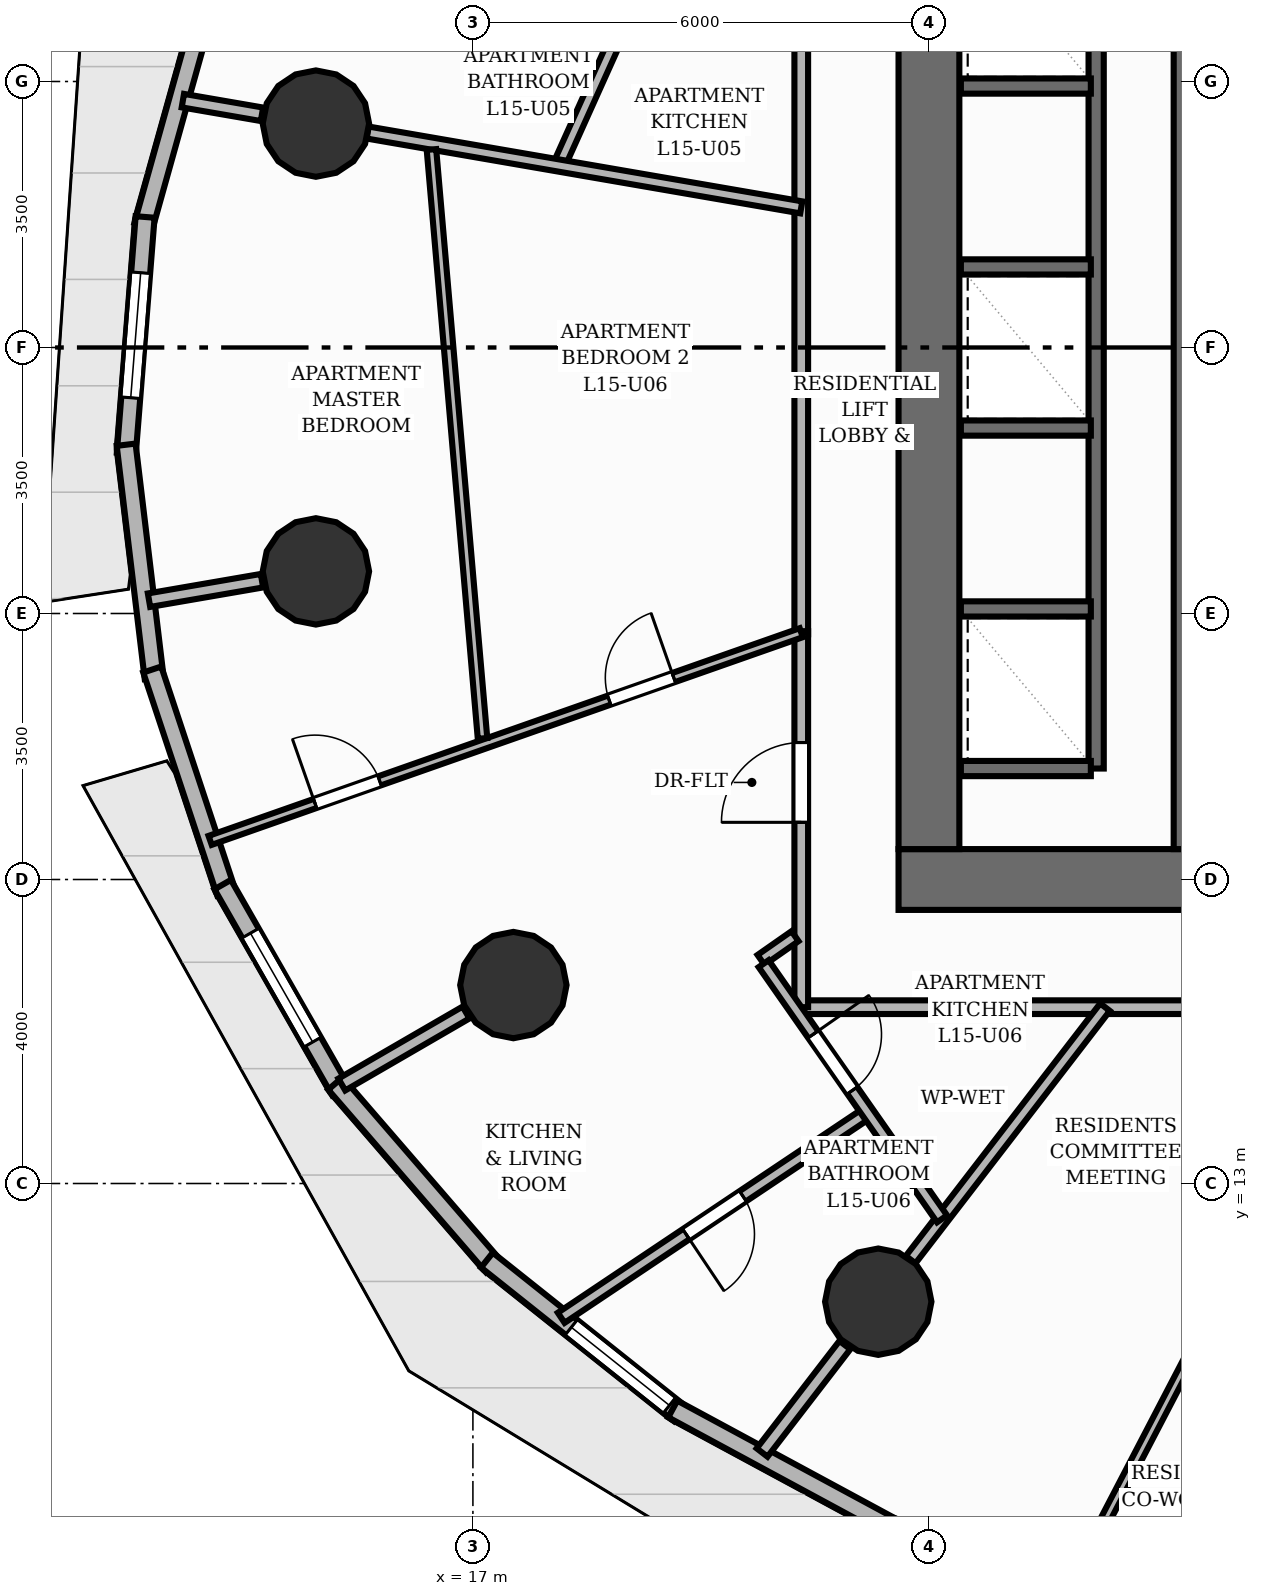
"""IFC4 building model, lengths in metres.
Left out: names, types, materials, properties, quantities, classifications, styles, units other than length and angle.
Written with IfcOpenShell. Run it as: python <this file> out.ifc"""

import sys

from ifc_helpers import new_model, si_unit, direction, frame, frame_2d, origin, origin_2d, place, context, subcontext, project, spatial, rectangle, circle, extrude, element, fill, save


model = new_model("IFC4")
c1 = context("Model", 3, precision=1e-05, world=origin(), true_north=direction((0.0, 1.0)))
c2 = subcontext(c1, "Body", "Model", "MODEL_VIEW")
j1 = project(units=[si_unit("LENGTHUNIT", "METRE"), si_unit("PLANEANGLEUNIT", "RADIAN")], contexts=[c1])
p1 = place(None, origin())
s1 = spatial("IfcSite", under=j1, at=p1, CompositionType="ELEMENT")
p2 = place(p1, origin())
s2 = spatial("IfcBuilding", under=s1, at=p2, CompositionType="ELEMENT")
p3 = place(p2, frame((0.0, 0.0, 53.6)))
s3 = spatial("IfcBuildingStorey", under=s2, at=p3, CompositionType="ELEMENT", Elevation=53.6)
p4 = place(p3, frame((22.6, 17.0, 0.0), z_axis=(0.0, 0.0, 1.0), x_axis=(1.0, 0.0, 0.0)))
e1 = element("IfcWall", 1, at=p4, inside=s3, PredefinedType="SHEAR", context=c2, shape_type="SweptSolid", body=[
    extrude(rectangle(XDim=18.8, YDim=0.8, at=frame_2d((9.4, 0.0))), origin(), (0.0, 0.0, 1.0), 3.2),
])
p5 = place(p4, frame((5.9, 0.0, 0.0)))
e2 = element("IfcOpeningElement", 2, at=p5, cuts=e1, PredefinedType="OPENING", context=c2, shape_type="SweptSolid", body=[
    extrude(rectangle(XDim=1.1, YDim=2.15, at=frame_2d((0.55, 1.075))), frame((0.0, 0.41, 0.0), z_axis=(0.0, -1.0, 0.0), x_axis=(1.0, 0.0, 0.0)), (0.0, 0.0, 1.0), 0.82),
])
p6 = place(p4, frame((9.45, 0.0, 0.0)))
e3 = element("IfcOpeningElement", 3, at=p6, cuts=e1, PredefinedType="OPENING", context=c2, shape_type="SweptSolid", body=[
    extrude(rectangle(XDim=0.9, YDim=2.1, at=frame_2d((0.45, 1.05))), frame((0.0, 0.41, 0.0), z_axis=(0.0, -1.0, 0.0), x_axis=(1.0, 0.0, 0.0)), (0.0, 0.0, 1.0), 0.82),
])
p7 = place(p3, frame((23.0, 17.4, 0.0), z_axis=(0.0, 0.0, 1.0), x_axis=(0.0, 1.0, 0.0)))
e4 = element("IfcWall", 4, at=p7, inside=s3, PredefinedType="SHEAR", context=c2, shape_type="SweptSolid", body=[
    extrude(rectangle(XDim=13.2, YDim=0.8, at=frame_2d((6.6, 0.0))), origin(), (0.0, 0.0, 1.0), 3.2),
])
p8 = place(p3, frame((26.5, 17.4, 0.0), z_axis=(0.0, 0.0, 1.0), x_axis=(0.0, 1.0, 0.0)))
e5 = element("IfcWall", 5, at=p8, inside=s3, PredefinedType="SHEAR", context=c2, shape_type="SweptSolid", body=[
    extrude(rectangle(XDim=13.2, YDim=0.56, at=frame_2d((6.6, 0.0))), origin(), (0.0, 0.0, 1.0), 3.2),
])
for number, where, z_axis, x_axis in (
    (6, (14.934, 26.946, 0.0), (0.0, 0.0, 1.0), (1.0, 0.0, 0.0)),
    (7, (14.934, 21.054, 0.0), (0.0, 0.0, 1.0), (1.0, 0.0, 0.0)),
    (8, (17.532, 15.611, 0.0), (0.0, 0.0, 1.0), (1.0, 0.0, 0.0)),
    (9, (22.333, 11.445, 0.0), (0.0, 0.0, 1.0), (1.0, 0.0, 0.0)),
):
    element("IfcColumn", number, at=place(p3, frame(where, z_axis=z_axis, x_axis=x_axis)), inside=s3, PredefinedType="COLUMN", context=c2, shape_type="SweptSolid", body=[
        extrude(circle(Radius=0.7, at=origin_2d()), origin(), (0.0, 0.0, 1.0), 3.2),
    ])
p9 = place(p3, frame((12.667, 25.605, 0.0), z_axis=(0.0, 0.0, 1.0), x_axis=(0.269353183383, 0.963041464632, 0.0)))
e10 = element("IfcWall", 10, at=p9, inside=s3, PredefinedType="SOLIDWALL", context=c2, shape_type="SweptSolid", body=[
    extrude(rectangle(XDim=3.174, YDim=0.25, at=frame_2d((1.587, 0.0))), origin(), (0.0, 0.0, 1.0), 2.96),
])
p10 = place(p3, frame((12.44, 22.606, 0.0), z_axis=(0.0, 0.0, 1.0), x_axis=(0.079173066737, 0.996860885733, 0.0)))
e11 = element("IfcWall", 11, at=p10, inside=s3, PredefinedType="SOLIDWALL", context=c2, shape_type="SweptSolid", body=[
    extrude(rectangle(XDim=3.121, YDim=0.25, at=frame_2d((1.56, 0.0))), origin(), (0.0, 0.0, 1.0), 2.96),
])
p11 = place(p10, frame((0.735, 0.0, 0.85)))
e12 = element("IfcOpeningElement", 12, at=p11, cuts=e11, PredefinedType="OPENING", context=c2, shape_type="SweptSolid", body=[
    extrude(rectangle(XDim=1.65, YDim=1.55, at=frame_2d((0.825, 0.775))), frame((0.0, 0.135, 0.0), z_axis=(0.0, -1.0, 0.0), x_axis=(1.0, 0.0, 0.0)), (0.0, 0.0, 1.0), 0.27),
])
p12 = place(p3, frame((12.806, 19.651, 0.0), z_axis=(0.0, 0.0, 1.0), x_axis=(-0.119310240224, 0.992857022223, 0.0)))
e13 = element("IfcWall", 13, at=p12, inside=s3, PredefinedType="SOLIDWALL", context=c2, shape_type="SweptSolid", body=[
    extrude(rectangle(XDim=3.092, YDim=0.25, at=frame_2d((1.546, 0.0))), origin(), (0.0, 0.0, 1.0), 2.96),
])
p13 = place(p3, frame((13.755, 16.828, 0.0), z_axis=(0.0, 0.0, 1.0), x_axis=(-0.314806164357, 0.949155982377, 0.0)))
e14 = element("IfcWall", 14, at=p13, inside=s3, PredefinedType="SOLIDWALL", context=c2, shape_type="SweptSolid", body=[
    extrude(rectangle(XDim=3.092, YDim=0.25, at=frame_2d((1.546, 0.0))), origin(), (0.0, 0.0, 1.0), 2.96),
])
p14 = place(p3, frame((15.256, 14.223, 0.0), z_axis=(0.0, 0.0, 1.0), x_axis=(-0.496155788519, 0.868233513243, 0.0)))
e15 = element("IfcWall", 15, at=p14, inside=s3, PredefinedType="SOLIDWALL", context=c2, shape_type="SweptSolid", body=[
    extrude(rectangle(XDim=3.121, YDim=0.25, at=frame_2d((1.56, 0.0))), origin(), (0.0, 0.0, 1.0), 2.96),
])
p15 = place(p14, frame((0.735, 0.0, 0.85)))
e16 = element("IfcOpeningElement", 16, at=p15, cuts=e15, PredefinedType="OPENING", context=c2, shape_type="SweptSolid", body=[
    extrude(rectangle(XDim=1.65, YDim=1.55, at=frame_2d((0.825, 0.775))), frame((0.0, 0.135, 0.0), z_axis=(0.0, -1.0, 0.0), x_axis=(1.0, 0.0, 0.0)), (0.0, 0.0, 1.0), 0.27),
])
p16 = place(p3, frame((17.266, 11.914, 0.0), z_axis=(0.0, 0.0, 1.0), x_axis=(-0.653770062489, 0.75669327035, 0.0)))
e17 = element("IfcWall", 17, at=p16, inside=s3, PredefinedType="SOLIDWALL", context=c2, shape_type="SweptSolid", body=[
    extrude(rectangle(XDim=3.174, YDim=0.25, at=frame_2d((1.587, 0.0))), origin(), (0.0, 0.0, 1.0), 2.96),
])
p17 = place(p3, frame((19.722, 9.971, 0.0), z_axis=(0.0, 0.0, 1.0), x_axis=(-0.78232767864, 0.622867083119, 0.0)))
e18 = element("IfcWall", 18, at=p17, inside=s3, PredefinedType="SOLIDWALL", context=c2, shape_type="SweptSolid", body=[
    extrude(rectangle(XDim=3.244, YDim=0.25, at=frame_2d((1.622, 0.0))), origin(), (0.0, 0.0, 1.0), 2.96),
])
p18 = place(p17, frame((0.175, 0.0, 0.85)))
e19 = element("IfcOpeningElement", 19, at=p18, cuts=e18, PredefinedType="OPENING", context=c2, shape_type="SweptSolid", body=[
    extrude(rectangle(XDim=1.65, YDim=1.55, at=frame_2d((0.825, 0.775))), frame((0.0, 0.135, 0.0), z_axis=(0.0, -1.0, 0.0), x_axis=(1.0, 0.0, 0.0)), (0.0, 0.0, 1.0), 0.27),
])
p19 = place(p3, frame((22.552, 8.454, 0.0), z_axis=(0.0, 0.0, 1.0), x_axis=(-0.879811992908, 0.475321845843, 0.0)))
e20 = element("IfcWall", 20, at=p19, inside=s3, PredefinedType="SOLIDWALL", context=c2, shape_type="SweptSolid", body=[
    extrude(rectangle(XDim=3.323, YDim=0.25, at=frame_2d((1.661, 0.0))), origin(), (0.0, 0.0, 1.0), 2.96),
])
p20 = place(p3, frame((25.67, 7.407, 0.0), z_axis=(0.0, 0.0, 1.0), x_axis=(-0.947149503871, 0.320792483262, 0.0)))
e21 = element("IfcWall", 21, at=p20, inside=s3, PredefinedType="SOLIDWALL", context=c2, shape_type="SweptSolid", body=[
    extrude(rectangle(XDim=3.399, YDim=0.25, at=frame_2d((1.699, 0.0))), origin(), (0.0, 0.0, 1.0), 2.96),
])
p21 = place(p20, frame((1.074, 0.0, 0.85)))
e22 = element("IfcOpeningElement", 22, at=p21, cuts=e21, PredefinedType="OPENING", context=c2, shape_type="SweptSolid", body=[
    extrude(rectangle(XDim=1.65, YDim=1.55, at=frame_2d((0.825, 0.775))), frame((0.0, 0.135, 0.0), z_axis=(0.0, -1.0, 0.0), x_axis=(1.0, 0.0, 0.0)), (0.0, 0.0, 1.0), 0.27),
])
p22 = place(p3, frame((25.2, 18.46, 0.0), z_axis=(0.0, 0.0, 1.0), x_axis=(0.0, 1.0, 0.0)))
e23 = element("IfcWall", 23, at=p22, inside=s3, PredefinedType="SHEAR", context=c2, shape_type="SweptSolid", body=[
    extrude(rectangle(XDim=11.08, YDim=0.2, at=frame_2d((5.54, 0.0))), origin(), (0.0, 0.0, 1.0), 3.2),
])
for number, where, z_axis, x_axis in (
    (24, (23.42, 18.46, 0.0), (0.0, 0.0, 1.0), (1.0, 0.0, 0.0)),
    (25, (23.42, 20.56, 0.0), (0.0, 0.0, 1.0), (1.0, 0.0, 0.0)),
    (26, (23.42, 22.94, 0.0), (0.0, 0.0, 1.0), (1.0, 0.0, 0.0)),
    (27, (23.42, 25.06, 0.0), (0.0, 0.0, 1.0), (1.0, 0.0, 0.0)),
    (28, (23.42, 27.44, 0.0), (0.0, 0.0, 1.0), (1.0, 0.0, 0.0)),
):
    element("IfcWall", number, at=place(p3, frame(where, z_axis=z_axis, x_axis=x_axis)), inside=s3, PredefinedType="SHEAR", context=c2, shape_type="SweptSolid", body=[
        extrude(rectangle(XDim=1.71, YDim=0.2, at=frame_2d((0.855, 0.0))), origin(), (0.0, 0.0, 1.0), 3.2),
    ])
p23 = place(p3, frame((14.225, 27.068, 0.0), z_axis=(0.0, 0.0, 1.0), x_axis=(-0.985428074572, 0.17009265077, 0.0)))
e29 = element("IfcWall", 29, at=p23, inside=s3, PredefinedType="PARTITIONING", context=c2, shape_type="SweptSolid", body=[
    extrude(rectangle(XDim=1.056, YDim=0.18, at=frame_2d((0.528, 0.0))), origin(), (0.0, 0.0, 1.0), 2.178),
])
p24 = place(p3, frame((14.225, 20.932, 0.0), z_axis=(0.0, 0.0, 1.0), x_axis=(-0.985418960314, -0.170145445587, 0.0)))
e30 = element("IfcWall", 30, at=p24, inside=s3, PredefinedType="PARTITIONING", context=c2, shape_type="SweptSolid", body=[
    extrude(rectangle(XDim=1.508, YDim=0.18, at=frame_2d((0.754, 0.0))), origin(), (0.0, 0.0, 1.0), 2.178),
])
p25 = place(p3, frame((16.909, 15.25, 0.0), z_axis=(0.0, 0.0, 1.0), x_axis=(-0.865027823723, -0.501723892379, 0.0)))
e31 = element("IfcWall", 31, at=p25, inside=s3, PredefinedType="PARTITIONING", context=c2, shape_type="SweptSolid", body=[
    extrude(rectangle(XDim=1.889, YDim=0.18, at=frame_2d((0.944, 0.0))), origin(), (0.0, 0.0, 1.0), 2.178),
])
p26 = place(p3, frame((21.894, 10.874, 0.0), z_axis=(0.0, 0.0, 1.0), x_axis=(-0.61002145357, -0.792384897752, 0.0)))
e32 = element("IfcWall", 32, at=p26, inside=s3, PredefinedType="PARTITIONING", context=c2, shape_type="SweptSolid", body=[
    extrude(rectangle(XDim=1.785, YDim=0.18, at=frame_2d((0.892, 0.0))), origin(), (0.0, 0.0, 1.0), 2.178),
])
p27 = place(p3, frame((28.852, 15.32, 0.0), z_axis=(0.0, 0.0, 1.0), x_axis=(-1.0, 0.0, 0.0)))
e33 = element("IfcWall", 33, at=p27, inside=s3, PredefinedType="PARTITIONING", context=c2, shape_type="SweptSolid", body=[
    extrude(rectangle(XDim=7.532, YDim=0.18, at=frame_2d((3.766, 0.0))), origin(), (0.0, 0.0, 1.0), 2.955),
])
p28 = place(p27, frame((1.33, 0.0, 0.0)))
e34 = element("IfcOpeningElement", 34, at=p28, cuts=e33, PredefinedType="OPENING", context=c2, shape_type="SweptSolid", body=[
    extrude(rectangle(XDim=0.9, YDim=2.1, at=frame_2d((0.45, 1.05))), frame((0.0, 0.1, 0.0), z_axis=(0.0, -1.0, 0.0), x_axis=(1.0, 0.0, 0.0)), (0.0, 0.0, 1.0), 0.2),
])
p29 = place(p3, frame((21.32, 20.226, 0.0), z_axis=(0.0, 0.0, 1.0), x_axis=(0.0, 1.0, 0.0)))
e35 = element("IfcWall", 35, at=p29, inside=s3, PredefinedType="PARTITIONING", context=c2, shape_type="SweptSolid", body=[
    extrude(rectangle(XDim=12.454, YDim=0.18, at=frame_2d((6.227, 0.0))), origin(), (0.0, 0.0, 1.0), 2.955),
])
p30 = place(p29, frame((9.711, 0.0, 0.0)))
e36 = element("IfcOpeningElement", 36, at=p30, cuts=e35, PredefinedType="OPENING", context=c2, shape_type="SweptSolid", body=[
    extrude(rectangle(XDim=1.05, YDim=2.15, at=frame_2d((0.525, 1.075))), frame((0.0, 0.1, 0.0), z_axis=(0.0, -1.0, 0.0), x_axis=(1.0, 0.0, 0.0)), (0.0, 0.0, 1.0), 0.2),
])
p31 = place(p3, frame((21.32, 15.32, 0.0), z_axis=(0.0, 0.0, 1.0), x_axis=(0.0, 1.0, 0.0)))
e37 = element("IfcWall", 37, at=p31, inside=s3, PredefinedType="PARTITIONING", context=c2, shape_type="SweptSolid", body=[
    extrude(rectangle(XDim=4.947, YDim=0.18, at=frame_2d((2.474, 0.0))), origin(), (0.0, 0.0, 1.0), 2.955),
])
p32 = place(p31, frame((2.432, 0.0, 0.0)))
e38 = element("IfcOpeningElement", 38, at=p32, cuts=e37, PredefinedType="OPENING", context=c2, shape_type="SweptSolid", body=[
    extrude(rectangle(XDim=1.05, YDim=2.15, at=frame_2d((0.525, 1.075))), frame((0.0, 0.1, 0.0), z_axis=(0.0, -1.0, 0.0), x_axis=(1.0, 0.0, 0.0)), (0.0, 0.0, 1.0), 0.2),
])
p33 = place(p3, frame((28.786, 15.231, 0.0), z_axis=(0.0, 0.0, 1.0), x_axis=(-0.461913695099, -0.886924877473, 0.0)))
e39 = element("IfcWall", 39, at=p33, inside=s3, PredefinedType="PARTITIONING", context=c2, shape_type="SweptSolid", body=[
    extrude(rectangle(XDim=8.495, YDim=0.125, at=frame_2d((4.247, 0.0))), origin(), (0.0, 0.0, 1.0), 2.641),
])
p34 = place(p33, frame((3.938, 0.0, 0.0)))
e40 = element("IfcOpeningElement", 40, at=p34, cuts=e39, PredefinedType="OPENING", context=c2, shape_type="SweptSolid", body=[
    extrude(rectangle(XDim=0.9, YDim=2.1, at=frame_2d((0.45, 1.05))), frame((0.0, 0.073, 0.0), z_axis=(0.0, -1.0, 0.0), x_axis=(1.0, 0.0, 0.0)), (0.0, 0.0, 1.0), 0.145),
])
p35 = place(p3, frame((22.759, 11.998, 0.0), z_axis=(0.0, 0.0, 1.0), x_axis=(0.60996965366, 0.792424773473, 0.0)))
e41 = element("IfcWall", 41, at=p35, inside=s3, PredefinedType="PLUMBINGWALL", context=c2, shape_type="SweptSolid", body=[
    extrude(rectangle(XDim=4.192, YDim=0.16, at=frame_2d((2.096, 0.0))), origin(), (0.0, 0.0, 1.0), 2.178),
])
p36 = place(p3, frame((26.193, 7.345, 0.0), z_axis=(0.0, 0.0, 1.0), x_axis=(0.392702721524, 0.919665467715, 0.0)))
e42 = element("IfcWall", 42, at=p36, inside=s3, PredefinedType="PARTITIONING", context=c2, shape_type="SweptSolid", body=[
    extrude(rectangle(XDim=8.552, YDim=0.125, at=frame_2d((4.276, 0.0))), origin(), (0.0, 0.0, 1.0), 2.955),
])
p37 = place(p3, frame((19.342, 29.089, 0.0), z_axis=(0.0, 0.0, 1.0), x_axis=(-0.410144748917, -0.912020441073, 0.0)))
e43 = element("IfcWall", 43, at=p37, inside=s3, PredefinedType="PLUMBINGWALL", context=c2, shape_type="SweptSolid", body=[
    extrude(rectangle(XDim=2.954, YDim=0.16, at=frame_2d((1.477, 0.0))), origin(), (0.0, 0.0, 1.0), 2.955),
])
p38 = place(p3, frame((21.32, 25.844, 0.0), z_axis=(0.0, 0.0, 1.0), x_axis=(-0.985429175336, 0.170086273394, 0.0)))
e44 = element("IfcWall", 44, at=p38, inside=s3, PredefinedType="PLUMBINGWALL", context=c2, shape_type="SweptSolid", body=[
    extrude(rectangle(XDim=5.789, YDim=0.16, at=frame_2d((2.895, 0.0))), origin(), (0.0, 0.0, 1.0), 2.178),
])
p39 = place(p3, frame((22.195, 13.933, 0.0), z_axis=(0.0, 0.0, 1.0), x_axis=(-0.831027380647, -0.556231509908, 0.0)))
e45 = element("IfcWall", 45, at=p39, inside=s3, PredefinedType="PLUMBINGWALL", context=c2, shape_type="SweptSolid", body=[
    extrude(rectangle(XDim=4.854, YDim=0.16, at=frame_2d((2.427, 0.0))), origin(), (0.0, 0.0, 1.0), 2.641),
])
p40 = place(p39, frame((1.977, 0.0, 0.0)))
e46 = element("IfcOpeningElement", 46, at=p40, cuts=e45, PredefinedType="OPENING", context=c2, shape_type="SweptSolid", body=[
    extrude(rectangle(XDim=0.9, YDim=2.1, at=frame_2d((0.45, 1.05))), frame((0.0, 0.09, 0.0), z_axis=(0.0, -1.0, 0.0), x_axis=(1.0, 0.0, 0.0)), (0.0, 0.0, 1.0), 0.18),
])
p41 = place(p3, frame((13.543, 17.515, 0.0), z_axis=(0.0, 0.0, 1.0), x_axis=(0.943466147543, 0.331468895131, 0.0)))
e47 = element("IfcWall", 47, at=p41, inside=s3, PredefinedType="PARTITIONING", context=c2, shape_type="SweptSolid", body=[
    extrude(rectangle(XDim=8.243, YDim=0.125, at=frame_2d((4.122, 0.0))), origin(), (0.0, 0.0, 1.0), 2.955),
])
p42 = place(p41, frame((1.463, 0.0, 0.0)))
e48 = element("IfcOpeningElement", 48, at=p42, cuts=e47, PredefinedType="OPENING", context=c2, shape_type="SweptSolid", body=[
    extrude(rectangle(XDim=0.9, YDim=2.1, at=frame_2d((0.45, 1.05))), frame((0.0, 0.073, 0.0), z_axis=(0.0, -1.0, 0.0), x_axis=(1.0, 0.0, 0.0)), (0.0, 0.0, 1.0), 0.145),
])
p43 = place(p41, frame((5.565, 0.0, 0.0)))
e49 = element("IfcOpeningElement", 49, at=p43, cuts=e47, PredefinedType="OPENING", context=c2, shape_type="SweptSolid", body=[
    extrude(rectangle(XDim=0.9, YDim=2.1, at=frame_2d((0.45, 1.05))), frame((0.0, 0.073, 0.0), z_axis=(0.0, -1.0, 0.0), x_axis=(1.0, 0.0, 0.0)), (0.0, 0.0, 1.0), 0.145),
])
p44 = place(p3, frame((21.238, 16.254, 0.0), z_axis=(0.0, 0.0, 1.0), x_axis=(-0.819589255208, -0.572951527398, 0.0)))
e50 = element("IfcWall", 50, at=p44, inside=s3, PredefinedType="PLUMBINGWALL", context=c2, shape_type="SweptSolid", body=[
    extrude(rectangle(XDim=0.545, YDim=0.16, at=frame_2d((0.273, 0.0))), origin(), (0.0, 0.0, 1.0), 2.955),
])
p45 = place(p3, frame((20.825, 15.893, 0.0), z_axis=(0.0, 0.0, 1.0), x_axis=(0.572966263624, -0.819578953334, 0.0)))
e51 = element("IfcWall", 51, at=p45, inside=s3, PredefinedType="PLUMBINGWALL", context=c2, shape_type="SweptSolid", body=[
    extrude(rectangle(XDim=4.096, YDim=0.16, at=frame_2d((2.048, 0.0))), origin(), (0.0, 0.0, 1.0), 2.955),
])
p46 = place(p45, frame((1.135, 0.0, 0.0)))
e52 = element("IfcOpeningElement", 52, at=p46, cuts=e51, PredefinedType="OPENING", context=c2, shape_type="SweptSolid", body=[
    extrude(rectangle(XDim=0.9, YDim=2.1, at=frame_2d((0.45, 1.05))), frame((0.0, 0.09, 0.0), z_axis=(0.0, -1.0, 0.0), x_axis=(1.0, 0.0, 0.0)), (0.0, 0.0, 1.0), 0.18),
])
p47 = place(p3, frame((16.455, 26.605, 0.0), z_axis=(0.0, 0.0, 1.0), x_axis=(0.086414248462, -0.996259292385, 0.0)))
e53 = element("IfcWall", 53, at=p47, inside=s3, PredefinedType="PARTITIONING", context=c2, shape_type="SweptSolid", body=[
    extrude(rectangle(XDim=7.778, YDim=0.125, at=frame_2d((3.889, 0.0))), origin(), (0.0, 0.0, 1.0), 2.955),
])
p48 = place(p11, origin())
e54 = element("IfcWindow", 54, at=p48, inside=s3, PartitioningType="SINGLE_PANEL", PredefinedType="WINDOW", context=c2, shape_type="SweptSolid", body=[
    extrude(rectangle(XDim=1.65, YDim=1.55, at=frame_2d((0.825, 0.775))), frame((0.0, 0.03, 0.0), z_axis=(0.0, -1.0, 0.0), x_axis=(1.0, 0.0, 0.0)), (0.0, 0.0, 1.0), 0.06),
])
fill(e12, e54)
p49 = place(p15, origin())
e55 = element("IfcWindow", 55, at=p49, inside=s3, PartitioningType="SINGLE_PANEL", PredefinedType="WINDOW", context=c2, shape_type="SweptSolid", body=[
    extrude(rectangle(XDim=1.65, YDim=1.55, at=frame_2d((0.825, 0.775))), frame((0.0, 0.03, 0.0), z_axis=(0.0, -1.0, 0.0), x_axis=(1.0, 0.0, 0.0)), (0.0, 0.0, 1.0), 0.06),
])
fill(e16, e55)
p50 = place(p18, origin())
e56 = element("IfcWindow", 56, at=p50, inside=s3, PartitioningType="SINGLE_PANEL", PredefinedType="WINDOW", context=c2, shape_type="SweptSolid", body=[
    extrude(rectangle(XDim=1.65, YDim=1.55, at=frame_2d((0.825, 0.775))), frame((0.0, 0.03, 0.0), z_axis=(0.0, -1.0, 0.0), x_axis=(1.0, 0.0, 0.0)), (0.0, 0.0, 1.0), 0.06),
])
fill(e19, e56)
p51 = place(p32, origin())
e57 = element("IfcDoor", 57, at=p51, inside=s3, OperationType="SINGLE_SWING_LEFT", PredefinedType="DOOR", context=c2, shape_type="SweptSolid", body=[
    extrude(rectangle(XDim=1.05, YDim=2.15, at=frame_2d((0.525, 1.075))), frame((0.0, 0.025, 0.0), z_axis=(0.0, -1.0, 0.0), x_axis=(1.0, 0.0, 0.0)), (0.0, 0.0, 1.0), 0.05),
])
fill(e38, e57)
p52 = place(p40, origin())
e58 = element("IfcDoor", 58, at=p52, inside=s3, OperationType="SINGLE_SWING_RIGHT", PredefinedType="DOOR", context=c2, shape_type="SweptSolid", body=[
    extrude(rectangle(XDim=0.9, YDim=2.1, at=frame_2d((0.45, 1.05))), frame((0.0, 0.025, 0.0), z_axis=(0.0, -1.0, 0.0), x_axis=(1.0, 0.0, 0.0)), (0.0, 0.0, 1.0), 0.05),
])
fill(e46, e58)
p53 = place(p42, origin())
e59 = element("IfcDoor", 59, at=p53, inside=s3, OperationType="SINGLE_SWING_LEFT", PredefinedType="DOOR", context=c2, shape_type="SweptSolid", body=[
    extrude(rectangle(XDim=0.9, YDim=2.1, at=frame_2d((0.45, 1.05))), frame((0.0, 0.025, 0.0), z_axis=(0.0, -1.0, 0.0), x_axis=(1.0, 0.0, 0.0)), (0.0, 0.0, 1.0), 0.05),
])
fill(e48, e59)
p54 = place(p43, origin())
e60 = element("IfcDoor", 60, at=p54, inside=s3, OperationType="SINGLE_SWING_RIGHT", PredefinedType="DOOR", context=c2, shape_type="SweptSolid", body=[
    extrude(rectangle(XDim=0.9, YDim=2.1, at=frame_2d((0.45, 1.05))), frame((0.0, 0.025, 0.0), z_axis=(0.0, -1.0, 0.0), x_axis=(1.0, 0.0, 0.0)), (0.0, 0.0, 1.0), 0.05),
])
fill(e49, e60)
p55 = place(p46, origin())
e61 = element("IfcDoor", 61, at=p55, inside=s3, OperationType="SINGLE_SWING_LEFT", PredefinedType="DOOR", context=c2, shape_type="SweptSolid", body=[
    extrude(rectangle(XDim=0.9, YDim=2.1, at=frame_2d((0.45, 1.05))), frame((0.0, 0.025, 0.0), z_axis=(0.0, -1.0, 0.0), x_axis=(1.0, 0.0, 0.0)), (0.0, 0.0, 1.0), 0.05),
])
fill(e52, e61)
save(model, sys.argv[1])
